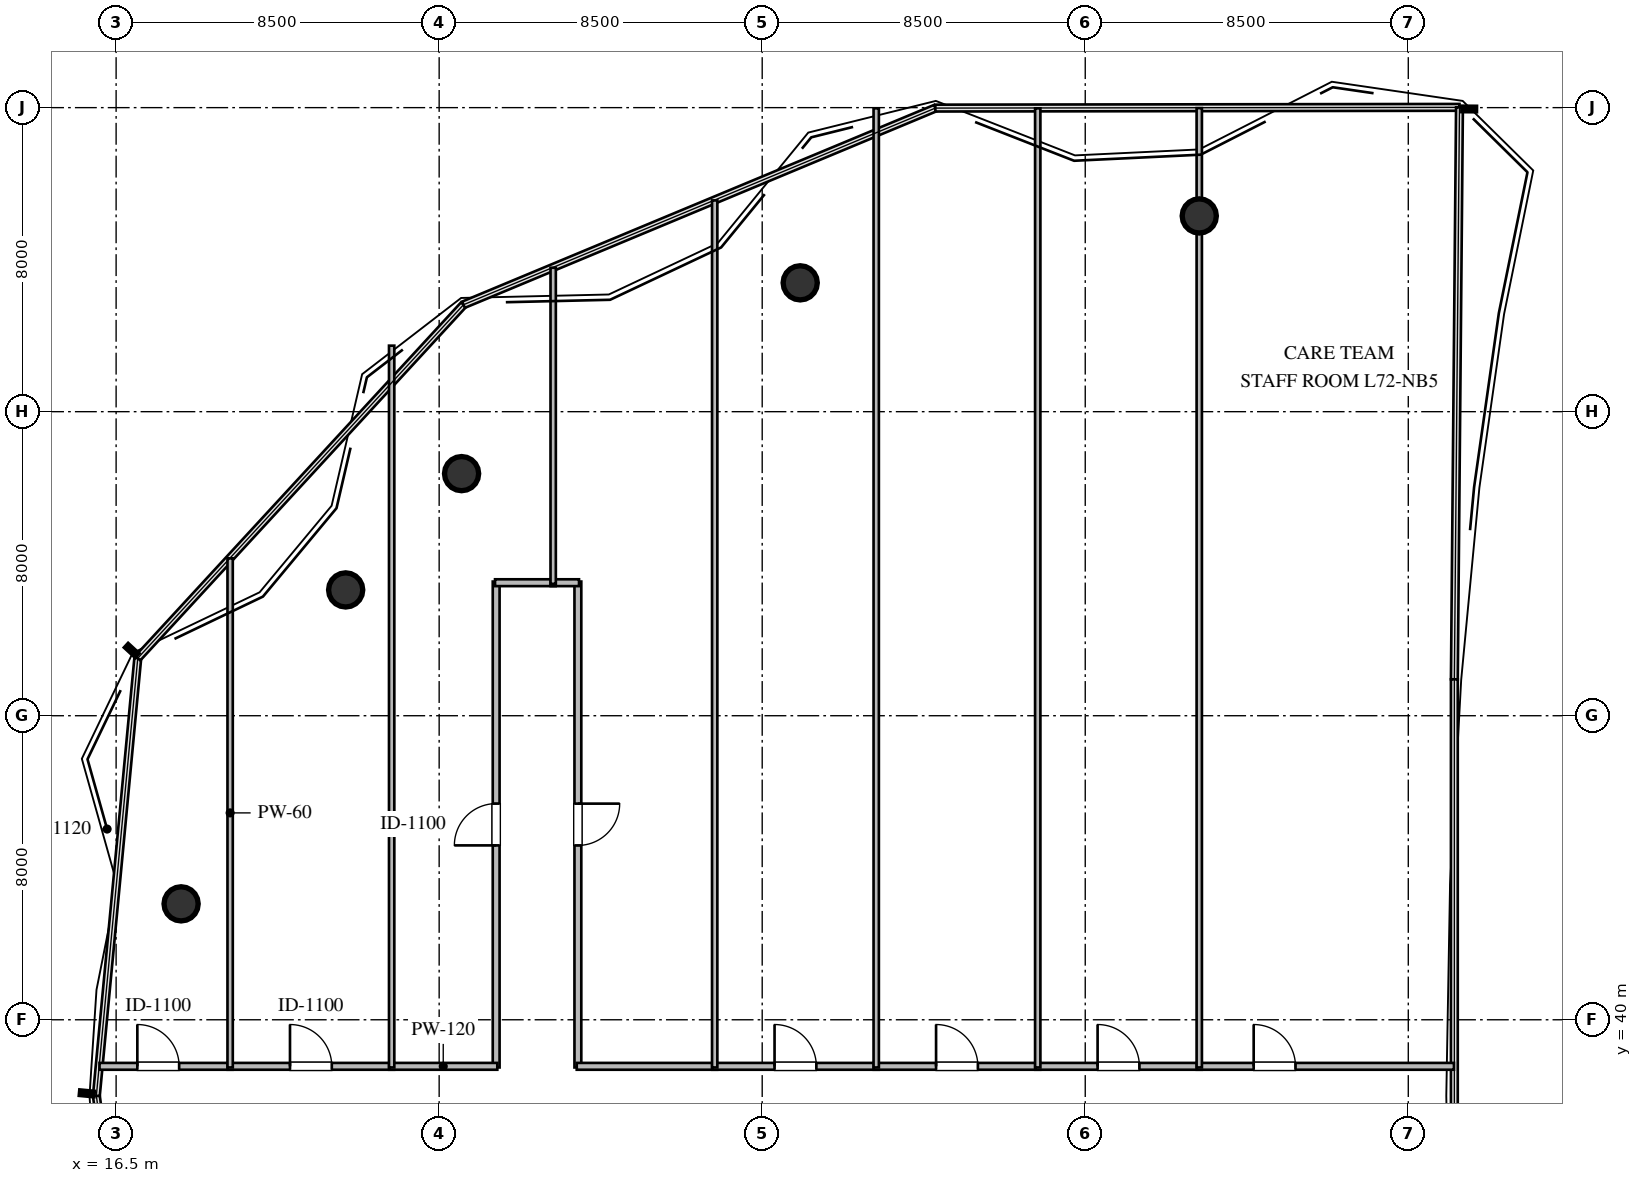
"""IFC4 building model, lengths in metres.
Left out: names, types, materials, properties, quantities, classifications, styles, units other than length and angle.
Written with IfcOpenShell. Run it as: python <this file> out.ifc"""

import sys

from ifc_helpers import new_model, si_unit, direction, frame, frame_2d, origin, origin_2d, place, context, subcontext, project, spatial, rectangle, circle, extrude, element, fill, save


model = new_model("IFC4")
c1 = context("Model", 3, precision=1e-05, world=origin(), true_north=direction((0.0, 1.0)))
c2 = subcontext(c1, "Body", "Model", "MODEL_VIEW")
j1 = project(units=[si_unit("LENGTHUNIT", "METRE"), si_unit("PLANEANGLEUNIT", "RADIAN")], contexts=[c1])
p1 = place(None, origin())
s1 = spatial("IfcSite", under=j1, at=p1, CompositionType="ELEMENT")
p2 = place(p1, origin())
s2 = spatial("IfcBuilding", under=s1, at=p2, CompositionType="ELEMENT")
p3 = place(p2, frame((0.0, 0.0, 273.8)))
s3 = spatial("IfcBuildingStorey", under=s2, at=p3, CompositionType="ELEMENT", Elevation=273.8)
for number, where, z_axis, x_axis in (
    (1, (45.0, 61.15, 0.0), (0.0, 0.0, 1.0), (1.0, 0.0, 0.0)),
    (2, (34.5, 59.39, 0.0), (0.0, 0.0, 1.0), (1.0, 0.0, 0.0)),
    (3, (25.59, 54.37, 0.0), (0.0, 0.0, 1.0), (1.0, 0.0, 0.0)),
    (4, (22.54, 51.31, 0.0), (0.0, 0.0, 1.0), (1.0, 0.0, 0.0)),
    (5, (18.21, 43.05, 0.0), (0.0, 0.0, 1.0), (1.0, 0.0, 0.0)),
):
    element("IfcColumn", number, at=place(p3, frame(where, z_axis=z_axis, x_axis=x_axis)), inside=s3, PredefinedType="COLUMN", context=c2, shape_type="SweptSolid", body=[
        extrude(circle(Radius=0.45, at=origin_2d()), origin(), (0.0, 0.0, 1.0), 3.8),
    ])
p4 = place(p3, frame((16.063, 38.775, 0.0), z_axis=(0.0, 0.0, 1.0), x_axis=(1.0, 0.0, 0.0)))
e6 = element("IfcWall", 6, at=p4, inside=s3, PredefinedType="PARTITIONING", context=c2, shape_type="SweptSolid", body=[
    extrude(rectangle(XDim=3.501, YDim=0.18, at=frame_2d((1.751, 0.0))), origin(), (0.0, 0.0, 1.0), 3.56),
])
p5 = place(p4, frame((0.995, 0.0, 0.0)))
e7 = element("IfcOpeningElement", 7, at=p5, cuts=e6, PredefinedType="OPENING", context=c2, shape_type="SweptSolid", body=[
    extrude(rectangle(XDim=1.1, YDim=2.1, at=frame_2d((0.55, 1.05))), frame((0.0, 0.1, 0.0), z_axis=(0.0, -1.0, 0.0), x_axis=(1.0, 0.0, 0.0)), (0.0, 0.0, 1.0), 0.2),
])
p6 = place(p3, frame((19.435, 38.775, 0.0), z_axis=(0.0, 0.0, 1.0), x_axis=(1.0, 0.0, 0.0)))
e8 = element("IfcWall", 8, at=p6, inside=s3, PredefinedType="PARTITIONING", context=c2, shape_type="SweptSolid", body=[
    extrude(rectangle(XDim=4.38, YDim=0.18, at=frame_2d((2.19, 0.0))), origin(), (0.0, 0.0, 1.0), 3.56),
])
p7 = place(p6, frame((1.64, 0.0, 0.0)))
e9 = element("IfcOpeningElement", 9, at=p7, cuts=e8, PredefinedType="OPENING", context=c2, shape_type="SweptSolid", body=[
    extrude(rectangle(XDim=1.1, YDim=2.1, at=frame_2d((0.55, 1.05))), frame((0.0, 0.1, 0.0), z_axis=(0.0, -1.0, 0.0), x_axis=(1.0, 0.0, 0.0)), (0.0, 0.0, 1.0), 0.2),
])
p8 = place(p3, frame((26.5, 38.745, 0.0), z_axis=(0.0, 0.0, 1.0), x_axis=(0.0, 1.0, 0.0)))
e10 = element("IfcWall", 10, at=p8, inside=s3, PredefinedType="PARTITIONING", context=c2, shape_type="SweptSolid", body=[
    extrude(rectangle(XDim=12.785, YDim=0.18, at=frame_2d((6.393, 0.0))), origin(), (0.0, 0.0, 1.0), 3.56),
])
p9 = place(p8, frame((5.843, 0.0, 0.0)))
e11 = element("IfcOpeningElement", 11, at=p9, cuts=e10, PredefinedType="OPENING", context=c2, shape_type="SweptSolid", body=[
    extrude(rectangle(XDim=1.1, YDim=2.1, at=frame_2d((0.55, 1.05))), frame((0.0, 0.1, 0.0), z_axis=(0.0, -1.0, 0.0), x_axis=(1.0, 0.0, 0.0)), (0.0, 0.0, 1.0), 0.2),
])
p10 = place(p3, frame((23.685, 38.775, 0.0), z_axis=(0.0, 0.0, 1.0), x_axis=(1.0, 0.0, 0.0)))
e12 = element("IfcWall", 12, at=p10, inside=s3, PredefinedType="PARTITIONING", context=c2, shape_type="SweptSolid", body=[
    extrude(rectangle(XDim=2.845, YDim=0.18, at=frame_2d((1.422, 0.0))), origin(), (0.0, 0.0, 1.0), 3.56),
])
p11 = place(p3, frame((26.47, 51.5, 0.0), z_axis=(0.0, 0.0, 1.0), x_axis=(1.0, 0.0, 0.0)))
e13 = element("IfcWall", 13, at=p11, inside=s3, PredefinedType="PARTITIONING", context=c2, shape_type="SweptSolid", body=[
    extrude(rectangle(XDim=1.595, YDim=0.18, at=frame_2d((0.797, 0.0))), origin(), (0.0, 0.0, 1.0), 3.56),
])
p12 = place(p3, frame((28.65, 51.53, 0.0), z_axis=(0.0, 0.0, 1.0), x_axis=(0.0, -1.0, 0.0)))
e14 = element("IfcWall", 14, at=p12, inside=s3, PredefinedType="PARTITIONING", context=c2, shape_type="SweptSolid", body=[
    extrude(rectangle(XDim=12.785, YDim=0.18, at=frame_2d((6.393, 0.0))), origin(), (0.0, 0.0, 1.0), 3.56),
])
p13 = place(p12, frame((5.843, 0.0, 0.0)))
e15 = element("IfcOpeningElement", 15, at=p13, cuts=e14, PredefinedType="OPENING", context=c2, shape_type="SweptSolid", body=[
    extrude(rectangle(XDim=1.1, YDim=2.1, at=frame_2d((0.55, 1.05))), frame((0.0, 0.1, 0.0), z_axis=(0.0, -1.0, 0.0), x_axis=(1.0, 0.0, 0.0)), (0.0, 0.0, 1.0), 0.2),
])
p14 = place(p3, frame((28.62, 38.775, 0.0), z_axis=(0.0, 0.0, 1.0), x_axis=(1.0, 0.0, 0.0)))
e16 = element("IfcWall", 16, at=p14, inside=s3, PredefinedType="PARTITIONING", context=c2, shape_type="SweptSolid", body=[
    extrude(rectangle(XDim=3.695, YDim=0.18, at=frame_2d((1.847, 0.0))), origin(), (0.0, 0.0, 1.0), 3.56),
])
p15 = place(p3, frame((27.935, 51.5, 0.0), z_axis=(0.0, 0.0, 1.0), x_axis=(1.0, 0.0, 0.0)))
e17 = element("IfcWall", 17, at=p15, inside=s3, PredefinedType="PARTITIONING", context=c2, shape_type="SweptSolid", body=[
    extrude(rectangle(XDim=0.745, YDim=0.18, at=frame_2d((0.373, 0.0))), origin(), (0.0, 0.0, 1.0), 3.56),
])
p16 = place(p3, frame((32.185, 38.775, 0.0), z_axis=(0.0, 0.0, 1.0), x_axis=(1.0, 0.0, 0.0)))
e18 = element("IfcWall", 18, at=p16, inside=s3, PredefinedType="PARTITIONING", context=c2, shape_type="SweptSolid", body=[
    extrude(rectangle(XDim=4.38, YDim=0.18, at=frame_2d((2.19, 0.0))), origin(), (0.0, 0.0, 1.0), 3.56),
])
p17 = place(p16, frame((1.64, 0.0, 0.0)))
e19 = element("IfcOpeningElement", 19, at=p17, cuts=e18, PredefinedType="OPENING", context=c2, shape_type="SweptSolid", body=[
    extrude(rectangle(XDim=1.1, YDim=2.1, at=frame_2d((0.55, 1.05))), frame((0.0, 0.1, 0.0), z_axis=(0.0, -1.0, 0.0), x_axis=(1.0, 0.0, 0.0)), (0.0, 0.0, 1.0), 0.2),
])
p18 = place(p3, frame((36.435, 38.775, 0.0), z_axis=(0.0, 0.0, 1.0), x_axis=(1.0, 0.0, 0.0)))
e20 = element("IfcWall", 20, at=p18, inside=s3, PredefinedType="PARTITIONING", context=c2, shape_type="SweptSolid", body=[
    extrude(rectangle(XDim=4.38, YDim=0.18, at=frame_2d((2.19, 0.0))), origin(), (0.0, 0.0, 1.0), 3.56),
])
p19 = place(p18, frame((1.64, 0.0, 0.0)))
e21 = element("IfcOpeningElement", 21, at=p19, cuts=e20, PredefinedType="OPENING", context=c2, shape_type="SweptSolid", body=[
    extrude(rectangle(XDim=1.1, YDim=2.1, at=frame_2d((0.55, 1.05))), frame((0.0, 0.1, 0.0), z_axis=(0.0, -1.0, 0.0), x_axis=(1.0, 0.0, 0.0)), (0.0, 0.0, 1.0), 0.2),
])
p20 = place(p3, frame((40.685, 38.775, 0.0), z_axis=(0.0, 0.0, 1.0), x_axis=(1.0, 0.0, 0.0)))
e22 = element("IfcWall", 22, at=p20, inside=s3, PredefinedType="PARTITIONING", context=c2, shape_type="SweptSolid", body=[
    extrude(rectangle(XDim=4.38, YDim=0.18, at=frame_2d((2.19, 0.0))), origin(), (0.0, 0.0, 1.0), 3.56),
])
p21 = place(p20, frame((1.64, 0.0, 0.0)))
e23 = element("IfcOpeningElement", 23, at=p21, cuts=e22, PredefinedType="OPENING", context=c2, shape_type="SweptSolid", body=[
    extrude(rectangle(XDim=1.1, YDim=2.1, at=frame_2d((0.55, 1.05))), frame((0.0, 0.1, 0.0), z_axis=(0.0, -1.0, 0.0), x_axis=(1.0, 0.0, 0.0)), (0.0, 0.0, 1.0), 0.2),
])
p22 = place(p3, frame((44.935, 38.775, 0.0), z_axis=(0.0, 0.0, 1.0), x_axis=(1.0, 0.0, 0.0)))
e24 = element("IfcWall", 24, at=p22, inside=s3, PredefinedType="PARTITIONING", context=c2, shape_type="SweptSolid", body=[
    extrude(rectangle(XDim=6.767, YDim=0.18, at=frame_2d((3.383, 0.0))), origin(), (0.0, 0.0, 1.0), 3.56),
])
p23 = place(p22, frame((1.497, 0.0, 0.0)))
e25 = element("IfcOpeningElement", 25, at=p23, cuts=e24, PredefinedType="OPENING", context=c2, shape_type="SweptSolid", body=[
    extrude(rectangle(XDim=1.1, YDim=2.1, at=frame_2d((0.55, 1.05))), frame((0.0, 0.1, 0.0), z_axis=(0.0, -1.0, 0.0), x_axis=(1.0, 0.0, 0.0)), (0.0, 0.0, 1.0), 0.2),
])
p24 = place(p3, frame((19.5, 52.141, 0.0), z_axis=(0.0, 0.0, 1.0), x_axis=(0.0, -1.0, 0.0)))
e26 = element("IfcWall", 26, at=p24, inside=s3, PredefinedType="PARTITIONING", context=c2, shape_type="SweptSolid", body=[
    extrude(rectangle(XDim=13.396, YDim=0.14, at=frame_2d((6.698, 0.0))), origin(), (0.0, 0.0, 1.0), 3.017),
])
p25 = place(p3, frame((23.75, 57.737, 0.0), z_axis=(0.0, 0.0, 1.0), x_axis=(0.0, -1.0, 0.0)))
e27 = element("IfcWall", 27, at=p25, inside=s3, PredefinedType="PARTITIONING", context=c2, shape_type="SweptSolid", body=[
    extrude(rectangle(XDim=18.992, YDim=0.14, at=frame_2d((9.496, 0.0))), origin(), (0.0, 0.0, 1.0), 3.006),
])
p26 = place(p3, frame((28.0, 59.787, 0.0), z_axis=(0.0, 0.0, 1.0), x_axis=(0.0, -1.0, 0.0)))
e28 = element("IfcWall", 28, at=p26, inside=s3, PredefinedType="PARTITIONING", context=c2, shape_type="SweptSolid", body=[
    extrude(rectangle(XDim=8.317, YDim=0.14, at=frame_2d((4.159, 0.0))), origin(), (0.0, 0.0, 1.0), 3.56),
])
p27 = place(p3, frame((32.25, 61.558, 0.0), z_axis=(0.0, 0.0, 1.0), x_axis=(0.0, -1.0, 0.0)))
e29 = element("IfcWall", 29, at=p27, inside=s3, PredefinedType="PARTITIONING", context=c2, shape_type="SweptSolid", body=[
    extrude(rectangle(XDim=22.813, YDim=0.14, at=frame_2d((11.407, 0.0))), origin(), (0.0, 0.0, 1.0), 3.56),
])
p28 = place(p3, frame((36.5, 63.982, 0.0), z_axis=(0.0, 0.0, 1.0), x_axis=(0.0, -1.0, 0.0)))
e30 = element("IfcWall", 30, at=p28, inside=s3, PredefinedType="PARTITIONING", context=c2, shape_type="SweptSolid", body=[
    extrude(rectangle(XDim=25.237, YDim=0.14, at=frame_2d((12.618, 0.0))), origin(), (0.0, 0.0, 1.0), 3.56),
])
p29 = place(p3, frame((40.75, 63.982, 0.0), z_axis=(0.0, 0.0, 1.0), x_axis=(0.0, -1.0, 0.0)))
e31 = element("IfcWall", 31, at=p29, inside=s3, PredefinedType="PARTITIONING", context=c2, shape_type="SweptSolid", body=[
    extrude(rectangle(XDim=25.237, YDim=0.14, at=frame_2d((12.618, 0.0))), origin(), (0.0, 0.0, 1.0), 3.56),
])
p30 = place(p3, frame((45.0, 63.988, 0.0), z_axis=(0.0, 0.0, 1.0), x_axis=(0.0, -1.0, 0.0)))
e32 = element("IfcWall", 32, at=p30, inside=s3, PredefinedType="PARTITIONING", context=c2, shape_type="SweptSolid", body=[
    extrude(rectangle(XDim=25.242, YDim=0.14, at=frame_2d((12.621, 0.0))), origin(), (0.0, 0.0, 1.0), 3.006),
])
p31 = place(p5, origin())
e33 = element("IfcDoor", 33, at=p31, inside=s3, OperationType="SINGLE_SWING_LEFT", PredefinedType="DOOR", context=c2, shape_type="SweptSolid", body=[
    extrude(rectangle(XDim=1.1, YDim=2.1, at=frame_2d((0.55, 1.05))), frame((0.0, 0.025, 0.0), z_axis=(0.0, -1.0, 0.0), x_axis=(1.0, 0.0, 0.0)), (0.0, 0.0, 1.0), 0.05),
])
fill(e7, e33)
p32 = place(p7, origin())
e34 = element("IfcDoor", 34, at=p32, inside=s3, OperationType="SINGLE_SWING_LEFT", PredefinedType="DOOR", context=c2, shape_type="SweptSolid", body=[
    extrude(rectangle(XDim=1.1, YDim=2.1, at=frame_2d((0.55, 1.05))), frame((0.0, 0.025, 0.0), z_axis=(0.0, -1.0, 0.0), x_axis=(1.0, 0.0, 0.0)), (0.0, 0.0, 1.0), 0.05),
])
fill(e9, e34)
p33 = place(p9, origin())
e35 = element("IfcDoor", 35, at=p33, inside=s3, OperationType="SINGLE_SWING_LEFT", PredefinedType="DOOR", context=c2, shape_type="SweptSolid", body=[
    extrude(rectangle(XDim=1.1, YDim=2.1, at=frame_2d((0.55, 1.05))), frame((0.0, 0.025, 0.0), z_axis=(0.0, -1.0, 0.0), x_axis=(1.0, 0.0, 0.0)), (0.0, 0.0, 1.0), 0.05),
])
fill(e11, e35)
p34 = place(p13, origin())
e36 = element("IfcDoor", 36, at=p34, inside=s3, OperationType="SINGLE_SWING_LEFT", PredefinedType="DOOR", context=c2, shape_type="SweptSolid", body=[
    extrude(rectangle(XDim=1.1, YDim=2.1, at=frame_2d((0.55, 1.05))), frame((0.0, 0.025, 0.0), z_axis=(0.0, -1.0, 0.0), x_axis=(1.0, 0.0, 0.0)), (0.0, 0.0, 1.0), 0.05),
])
fill(e15, e36)
p35 = place(p17, origin())
e37 = element("IfcDoor", 37, at=p35, inside=s3, OperationType="SINGLE_SWING_LEFT", PredefinedType="DOOR", context=c2, shape_type="SweptSolid", body=[
    extrude(rectangle(XDim=1.1, YDim=2.1, at=frame_2d((0.55, 1.05))), frame((0.0, 0.025, 0.0), z_axis=(0.0, -1.0, 0.0), x_axis=(1.0, 0.0, 0.0)), (0.0, 0.0, 1.0), 0.05),
])
fill(e19, e37)
p36 = place(p19, origin())
e38 = element("IfcDoor", 38, at=p36, inside=s3, OperationType="SINGLE_SWING_LEFT", PredefinedType="DOOR", context=c2, shape_type="SweptSolid", body=[
    extrude(rectangle(XDim=1.1, YDim=2.1, at=frame_2d((0.55, 1.05))), frame((0.0, 0.025, 0.0), z_axis=(0.0, -1.0, 0.0), x_axis=(1.0, 0.0, 0.0)), (0.0, 0.0, 1.0), 0.05),
])
fill(e21, e38)
p37 = place(p21, origin())
e39 = element("IfcDoor", 39, at=p37, inside=s3, OperationType="SINGLE_SWING_LEFT", PredefinedType="DOOR", context=c2, shape_type="SweptSolid", body=[
    extrude(rectangle(XDim=1.1, YDim=2.1, at=frame_2d((0.55, 1.05))), frame((0.0, 0.025, 0.0), z_axis=(0.0, -1.0, 0.0), x_axis=(1.0, 0.0, 0.0)), (0.0, 0.0, 1.0), 0.05),
])
fill(e23, e39)
p38 = place(p23, origin())
e40 = element("IfcDoor", 40, at=p38, inside=s3, OperationType="SINGLE_SWING_LEFT", PredefinedType="DOOR", context=c2, shape_type="SweptSolid", body=[
    extrude(rectangle(XDim=1.1, YDim=2.1, at=frame_2d((0.55, 1.05))), frame((0.0, 0.025, 0.0), z_axis=(0.0, -1.0, 0.0), x_axis=(1.0, 0.0, 0.0)), (0.0, 0.0, 1.0), 0.05),
])
fill(e25, e40)
save(model, sys.argv[1])
